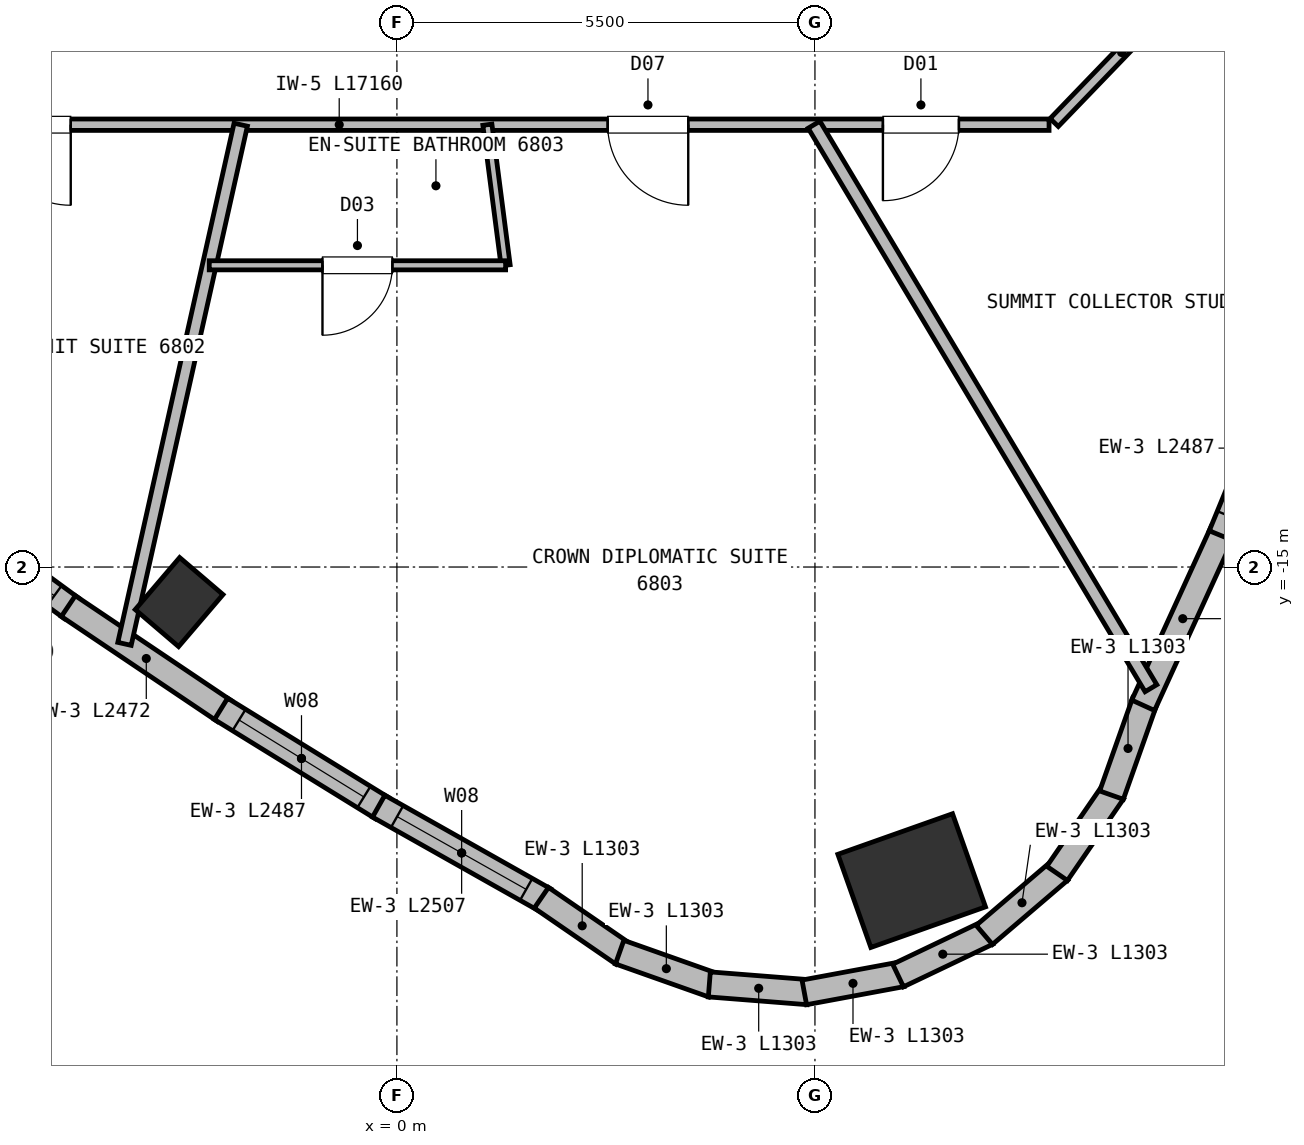
"""IFC4 building model, lengths in metres.
Left out: names, types, materials, properties, quantities, classifications, styles, units other than length and angle.
Written with IfcOpenShell. Run it as: python <this file> out.ifc"""

import sys

from ifc_helpers import new_model, si_unit, direction, frame, frame_2d, origin, origin_2d, place, context, subcontext, project, spatial, rectangle, extrude, element, fill, save


model = new_model("IFC4")
c1 = context("Model", 3, precision=1e-05, world=origin(), true_north=direction((0.0, 1.0)))
c2 = subcontext(c1, "Body", "Model", "MODEL_VIEW")
j1 = project(units=[si_unit("LENGTHUNIT", "METRE"), si_unit("PLANEANGLEUNIT", "RADIAN")], contexts=[c1])
p1 = place(None, origin())
s1 = spatial("IfcSite", under=j1, at=p1, CompositionType="ELEMENT")
p2 = place(p1, origin())
s2 = spatial("IfcBuilding", under=s1, at=p2, CompositionType="ELEMENT")
p3 = place(p2, frame((0.0, 0.0, 260.2)))
s3 = spatial("IfcBuildingStorey", under=s2, at=p3, CompositionType="ELEMENT", Elevation=260.2)
p4 = place(p3, frame((-2.865, -15.461, 0.0), z_axis=(0.0, 0.0, 1.0), x_axis=(-0.7604059656, 0.64944804833, 0.0)))
e1 = element("IfcColumn", 1, at=p4, inside=s3, PredefinedType="COLUMN", context=c2, shape_type="SweptSolid", body=[
    extrude(rectangle(XDim=0.75, YDim=0.9, at=origin_2d()), origin(), (0.0, 0.0, 1.0), 4.2),
])
p5 = place(p3, frame((6.773, -19.126, 0.0), z_axis=(0.0, 0.0, 1.0), x_axis=(-0.333806859234, 0.942641491092, 0.0)))
e2 = element("IfcColumn", 2, at=p5, inside=s3, PredefinedType="COLUMN", context=c2, shape_type="SweptSolid", body=[
    extrude(rectangle(XDim=1.3, YDim=1.6, at=origin_2d()), origin(), (0.0, 0.0, 1.0), 4.2),
])
p6 = place(p3, frame((-4.282, -15.543, 0.0), z_axis=(0.0, 0.0, 1.0), x_axis=(-0.806878025258, 0.59071808196, 0.0)))
e3 = element("IfcWall", 3, at=p6, inside=s3, PredefinedType="SOLIDWALL", context=c2, shape_type="SweptSolid", body=[
    extrude(rectangle(XDim=2.46, YDim=0.33, at=frame_2d((1.23, 0.0))), origin(), (0.0, 0.0, 1.0), 3.95),
])
p7 = place(p6, frame((0.28, 0.0, 0.72)))
e4 = element("IfcOpeningElement", 4, at=p7, cuts=e3, PredefinedType="OPENING", context=c2, shape_type="SweptSolid", body=[
    extrude(rectangle(XDim=1.9, YDim=2.1, at=frame_2d((0.95, 1.05))), frame((0.0, 0.175, 0.0), z_axis=(0.0, -1.0, 0.0), x_axis=(1.0, 0.0, 0.0)), (0.0, 0.0, 1.0), 0.35),
])
p8 = place(p3, frame((-2.272, -16.894, 0.0), z_axis=(0.0, 0.0, 1.0), x_axis=(-0.829748723079, 0.558137130594, 0.0)))
e5 = element("IfcWall", 5, at=p8, inside=s3, PredefinedType="SOLIDWALL", context=c2, shape_type="SweptSolid", body=[
    extrude(rectangle(XDim=2.472, YDim=0.33, at=frame_2d((1.236, 0.0))), origin(), (0.0, 0.0, 1.0), 3.95),
])
p9 = place(p3, frame((-0.197, -18.172, 0.0), z_axis=(0.0, 0.0, 1.0), x_axis=(-0.851175986277, 0.524880405792, 0.0)))
e6 = element("IfcWall", 6, at=p9, inside=s3, PredefinedType="SOLIDWALL", context=c2, shape_type="SweptSolid", body=[
    extrude(rectangle(XDim=2.487, YDim=0.33, at=frame_2d((1.244, 0.0))), origin(), (0.0, 0.0, 1.0), 3.95),
])
p10 = place(p9, frame((0.279, 0.0, 0.72)))
e7 = element("IfcOpeningElement", 7, at=p10, cuts=e6, PredefinedType="OPENING", context=c2, shape_type="SweptSolid", body=[
    extrude(rectangle(XDim=1.93, YDim=2.1, at=frame_2d((0.965, 1.05))), frame((0.0, 0.175, 0.0), z_axis=(0.0, -1.0, 0.0), x_axis=(1.0, 0.0, 0.0)), (0.0, 0.0, 1.0), 0.35),
])
p11 = place(p3, frame((1.943, -19.378, 0.0), z_axis=(0.0, 0.0, 1.0), x_axis=(-0.870968849899, 0.491338236357, 0.0)))
e8 = element("IfcWall", 8, at=p11, inside=s3, PredefinedType="SOLIDWALL", context=c2, shape_type="SweptSolid", body=[
    extrude(rectangle(XDim=2.507, YDim=0.33, at=frame_2d((1.253, 0.0))), origin(), (0.0, 0.0, 1.0), 3.95),
])
p12 = place(p11, frame((0.278, 0.0, 0.72)))
e9 = element("IfcOpeningElement", 9, at=p12, cuts=e8, PredefinedType="OPENING", context=c2, shape_type="SweptSolid", body=[
    extrude(rectangle(XDim=1.95, YDim=2.1, at=frame_2d((0.975, 1.05))), frame((0.0, 0.175, 0.0), z_axis=(0.0, -1.0, 0.0), x_axis=(1.0, 0.0, 0.0)), (0.0, 0.0, 1.0), 0.35),
])
p13 = place(p3, frame((2.975, -20.09, 0.0), z_axis=(0.0, 0.0, 1.0), x_axis=(-0.824096593529, 0.566449295643, 0.0)))
e10 = element("IfcWall", 10, at=p13, inside=s3, PredefinedType="SOLIDWALL", context=c2, shape_type="SweptSolid", body=[
    extrude(rectangle(XDim=1.303, YDim=0.33, at=frame_2d((0.651, 0.0))), origin(), (0.0, 0.0, 1.0), 3.95),
])
p14 = place(p3, frame((4.159, -20.502, 0.0), z_axis=(0.0, 0.0, 1.0), x_axis=(-0.942637049927, 0.333819400431, 0.0)))
e11 = element("IfcWall", 11, at=p14, inside=s3, PredefinedType="SOLIDWALL", context=c2, shape_type="SweptSolid", body=[
    extrude(rectangle(XDim=1.303, YDim=0.33, at=frame_2d((0.652, 0.0))), origin(), (0.0, 0.0, 1.0), 3.95),
])
for number, where, z_axis, x_axis in (
    (12, (5.409, -20.594, 0.0), (0.0, 0.0, 1.0), (-0.997, 0.079, 0.0)),
    (13, (6.641, -20.359, 0.0), (0.0, 0.0, 1.0), (-0.983, -0.182, 0.0)),
):
    element("IfcWall", number, at=place(p3, frame(where, z_axis=z_axis, x_axis=x_axis)), inside=s3, PredefinedType="SOLIDWALL", context=c2, shape_type="SweptSolid", body=[
        extrude(rectangle(XDim=1.303, YDim=0.33, at=frame_2d((0.651, 0.0))), origin(), (0.0, 0.0, 1.0), 3.95),
    ])
p15 = place(p3, frame((7.77, -19.813, 0.0), z_axis=(0.0, 0.0, 1.0), x_axis=(-0.902590242775, -0.430500701099, 0.0)))
e14 = element("IfcWall", 14, at=p15, inside=s3, PredefinedType="SOLIDWALL", context=c2, shape_type="SweptSolid", body=[
    extrude(rectangle(XDim=1.303, YDim=0.33, at=frame_2d((0.652, 0.0))), origin(), (0.0, 0.0, 1.0), 3.95),
])
for number, where, z_axis, x_axis in (
    (15, (8.719, -18.994, 0.0), (0.0, 0.0, 1.0), (-0.76, -0.649, 0.0)),
    (16, (9.424, -17.957, 0.0), (0.0, 0.0, 1.0), (-0.566, -0.824, 0.0)),
):
    element("IfcWall", number, at=place(p3, frame(where, z_axis=z_axis, x_axis=x_axis)), inside=s3, PredefinedType="SOLIDWALL", context=c2, shape_type="SweptSolid", body=[
        extrude(rectangle(XDim=1.303, YDim=0.33, at=frame_2d((0.651, 0.0))), origin(), (0.0, 0.0, 1.0), 3.95),
    ])
p16 = place(p3, frame((9.837, -16.773, 0.0), z_axis=(0.0, 0.0, 1.0), x_axis=(-0.333652931337, -0.942695985676, 0.0)))
e17 = element("IfcWall", 17, at=p16, inside=s3, PredefinedType="SOLIDWALL", context=c2, shape_type="SweptSolid", body=[
    extrude(rectangle(XDim=1.303, YDim=0.33, at=frame_2d((0.652, 0.0))), origin(), (0.0, 0.0, 1.0), 3.95),
])
p17 = place(p3, frame((10.86, -14.54, 0.0), z_axis=(0.0, 0.0, 1.0), x_axis=(-0.415812703035, -0.909450271315, 0.0)))
e18 = element("IfcWall", 18, at=p17, inside=s3, PredefinedType="SOLIDWALL", context=c2, shape_type="SweptSolid", body=[
    extrude(rectangle(XDim=2.507, YDim=0.33, at=frame_2d((1.253, 0.0))), origin(), (0.0, 0.0, 1.0), 3.95),
])
p18 = place(p3, frame((11.786, -12.285, 0.0), z_axis=(0.0, 0.0, 1.0), x_axis=(-0.380073332614, -0.92495635672, 0.0)))
e19 = element("IfcWall", 19, at=p18, inside=s3, PredefinedType="SOLIDWALL", context=c2, shape_type="SweptSolid", body=[
    extrude(rectangle(XDim=2.487, YDim=0.33, at=frame_2d((1.244, 0.0))), origin(), (0.0, 0.0, 1.0), 3.95),
])
p19 = place(p18, frame((0.279, 0.0, 0.72)))
e20 = element("IfcOpeningElement", 20, at=p19, cuts=e19, PredefinedType="OPENING", context=c2, shape_type="SweptSolid", body=[
    extrude(rectangle(XDim=1.93, YDim=2.1, at=frame_2d((0.965, 1.05))), frame((0.0, 0.175, 0.0), z_axis=(0.0, -1.0, 0.0), x_axis=(1.0, 0.0, 0.0)), (0.0, 0.0, 1.0), 0.35),
])
p20 = place(p3, frame((8.58, -9.18, 0.0), z_axis=(0.0, 0.0, 1.0), x_axis=(-1.0, 0.0, 0.0)))
e21 = element("IfcWall", 21, at=p20, inside=s3, PredefinedType="PARTITIONING", context=c2, shape_type="SweptSolid", body=[
    extrude(rectangle(XDim=17.16, YDim=0.15, at=frame_2d((8.58, 0.0))), origin(), (0.0, 0.0, 1.0), 3.66),
])
p21 = place(p20, frame((12.871, 0.0, 0.0)))
e22 = element("IfcOpeningElement", 22, at=p21, cuts=e21, PredefinedType="OPENING", context=c2, shape_type="SweptSolid", body=[
    extrude(rectangle(XDim=1.06, YDim=2.15, at=frame_2d((0.53, 1.075))), frame((0.0, 0.085, 0.0), z_axis=(0.0, -1.0, 0.0), x_axis=(1.0, 0.0, 0.0)), (0.0, 0.0, 1.0), 0.17),
])
p22 = place(p20, frame((1.186, 0.0, 0.0)))
e23 = element("IfcOpeningElement", 23, at=p22, cuts=e21, PredefinedType="OPENING", context=c2, shape_type="SweptSolid", body=[
    extrude(rectangle(XDim=1.0, YDim=2.15, at=frame_2d((0.5, 1.075))), frame((0.0, 0.085, 0.0), z_axis=(0.0, -1.0, 0.0), x_axis=(1.0, 0.0, 0.0)), (0.0, 0.0, 1.0), 0.17),
])
p23 = place(p20, frame((4.747, 0.0, 0.0)))
e24 = element("IfcOpeningElement", 24, at=p23, cuts=e21, PredefinedType="OPENING", context=c2, shape_type="SweptSolid", body=[
    extrude(rectangle(XDim=1.06, YDim=2.15, at=frame_2d((0.53, 1.075))), frame((0.0, 0.085, 0.0), z_axis=(0.0, -1.0, 0.0), x_axis=(1.0, 0.0, 0.0)), (0.0, 0.0, 1.0), 0.17),
])
p24 = place(p3, frame((10.422, -7.309, 0.0), z_axis=(0.0, 0.0, 1.0), x_axis=(-0.693764562202, -0.720201869085, 0.0)))
e25 = element("IfcWall", 25, at=p24, inside=s3, PredefinedType="PARTITIONING", context=c2, shape_type="SweptSolid", body=[
    extrude(rectangle(XDim=2.558, YDim=0.15, at=frame_2d((1.279, 0.0))), origin(), (0.0, 0.0, 1.0), 3.95),
])
p25 = place(p3, frame((-2.055, -9.18, 0.0), z_axis=(0.0, 0.0, 1.0), x_axis=(-0.218433184148, -0.97585190683, 0.0)))
e26 = element("IfcWall", 26, at=p25, inside=s3, PredefinedType="PARTITIONING", context=c2, shape_type="SweptSolid", body=[
    extrude(rectangle(XDim=7.0, YDim=0.18, at=frame_2d((3.5, 0.0))), origin(), (0.0, 0.0, 1.0), 3.95),
])
p26 = place(p3, frame((1.19, -9.18, 0.0), z_axis=(0.0, 0.0, 1.0), x_axis=(0.128639829388, -0.991691380569, 0.0)))
e27 = element("IfcWall", 27, at=p26, inside=s3, PredefinedType="PARTITIONING", context=c2, shape_type="SweptSolid", body=[
    extrude(rectangle(XDim=1.865, YDim=0.12, at=frame_2d((0.933, 0.0))), origin(), (0.0, 0.0, 1.0), 3.95),
])
p27 = place(p3, frame((1.43, -11.03, 0.0), z_axis=(0.0, 0.0, 1.0), x_axis=(-1.0, 0.0, 0.0)))
e28 = element("IfcWall", 28, at=p27, inside=s3, PredefinedType="PARTITIONING", context=c2, shape_type="SweptSolid", body=[
    extrude(rectangle(XDim=3.899, YDim=0.12, at=frame_2d((1.95, 0.0))), origin(), (0.0, 0.0, 1.0), 3.66),
])
p28 = place(p27, frame((1.49, 0.0, 0.0)))
e29 = element("IfcOpeningElement", 29, at=p28, cuts=e28, PredefinedType="OPENING", context=c2, shape_type="SweptSolid", body=[
    extrude(rectangle(XDim=0.92, YDim=2.1, at=frame_2d((0.46, 1.05))), frame((0.0, 0.07, 0.0), z_axis=(0.0, -1.0, 0.0), x_axis=(1.0, 0.0, 0.0)), (0.0, 0.0, 1.0), 0.14),
])
p29 = place(p3, frame((5.488, -9.18, 0.0), z_axis=(0.0, 0.0, 1.0), x_axis=(0.513144382801, -0.858302302455, 0.0)))
e30 = element("IfcWall", 30, at=p29, inside=s3, PredefinedType="PARTITIONING", context=c2, shape_type="SweptSolid", body=[
    extrude(rectangle(XDim=8.639, YDim=0.18, at=frame_2d((4.319, 0.0))), origin(), (0.0, 0.0, 1.0), 3.95),
])
p30 = place(p7, origin())
e31 = element("IfcWindow", 31, at=p30, inside=s3, PartitioningType="SINGLE_PANEL", PredefinedType="WINDOW", context=c2, shape_type="SweptSolid", body=[
    extrude(rectangle(XDim=1.9, YDim=2.1, at=frame_2d((0.95, 1.05))), frame((0.0, 0.03, 0.0), z_axis=(0.0, -1.0, 0.0), x_axis=(1.0, 0.0, 0.0)), (0.0, 0.0, 1.0), 0.06),
])
fill(e4, e31)
p31 = place(p10, origin())
e32 = element("IfcWindow", 32, at=p31, inside=s3, PartitioningType="SINGLE_PANEL", PredefinedType="WINDOW", context=c2, shape_type="SweptSolid", body=[
    extrude(rectangle(XDim=1.93, YDim=2.1, at=frame_2d((0.965, 1.05))), frame((0.0, 0.03, 0.0), z_axis=(0.0, -1.0, 0.0), x_axis=(1.0, 0.0, 0.0)), (0.0, 0.0, 1.0), 0.06),
])
fill(e7, e32)
p32 = place(p12, origin())
e33 = element("IfcWindow", 33, at=p32, inside=s3, PartitioningType="SINGLE_PANEL", PredefinedType="WINDOW", context=c2, shape_type="SweptSolid", body=[
    extrude(rectangle(XDim=1.95, YDim=2.1, at=frame_2d((0.975, 1.05))), frame((0.0, 0.03, 0.0), z_axis=(0.0, -1.0, 0.0), x_axis=(1.0, 0.0, 0.0)), (0.0, 0.0, 1.0), 0.06),
])
fill(e9, e33)
p33 = place(p28, origin())
e34 = element("IfcDoor", 34, at=p33, inside=s3, OperationType="SINGLE_SWING_RIGHT", PredefinedType="DOOR", context=c2, shape_type="SweptSolid", body=[
    extrude(rectangle(XDim=0.92, YDim=2.1, at=frame_2d((0.46, 1.05))), frame((0.0, 0.025, 0.0), z_axis=(0.0, -1.0, 0.0), x_axis=(1.0, 0.0, 0.0)), (0.0, 0.0, 1.0), 0.05),
])
fill(e29, e34)
p34 = place(p21, origin())
e35 = element("IfcDoor", 35, at=p34, inside=s3, OperationType="SINGLE_SWING_LEFT", PredefinedType="DOOR", context=c2, shape_type="SweptSolid", body=[
    extrude(rectangle(XDim=1.06, YDim=2.15, at=frame_2d((0.53, 1.075))), frame((0.0, 0.025, 0.0), z_axis=(0.0, -1.0, 0.0), x_axis=(1.0, 0.0, 0.0)), (0.0, 0.0, 1.0), 0.05),
])
fill(e22, e35)
p35 = place(p22, origin())
e36 = element("IfcDoor", 36, at=p35, inside=s3, OperationType="SINGLE_SWING_RIGHT", PredefinedType="DOOR", context=c2, shape_type="SweptSolid", body=[
    extrude(rectangle(XDim=1.0, YDim=2.15, at=frame_2d((0.5, 1.075))), frame((0.0, 0.025, 0.0), z_axis=(0.0, -1.0, 0.0), x_axis=(1.0, 0.0, 0.0)), (0.0, 0.0, 1.0), 0.05),
])
fill(e23, e36)
p36 = place(p23, origin())
e37 = element("IfcDoor", 37, at=p36, inside=s3, OperationType="SINGLE_SWING_LEFT", PredefinedType="DOOR", context=c2, shape_type="SweptSolid", body=[
    extrude(rectangle(XDim=1.06, YDim=2.15, at=frame_2d((0.53, 1.075))), frame((0.0, 0.025, 0.0), z_axis=(0.0, -1.0, 0.0), x_axis=(1.0, 0.0, 0.0)), (0.0, 0.0, 1.0), 0.05),
])
fill(e24, e37)
save(model, sys.argv[1])
